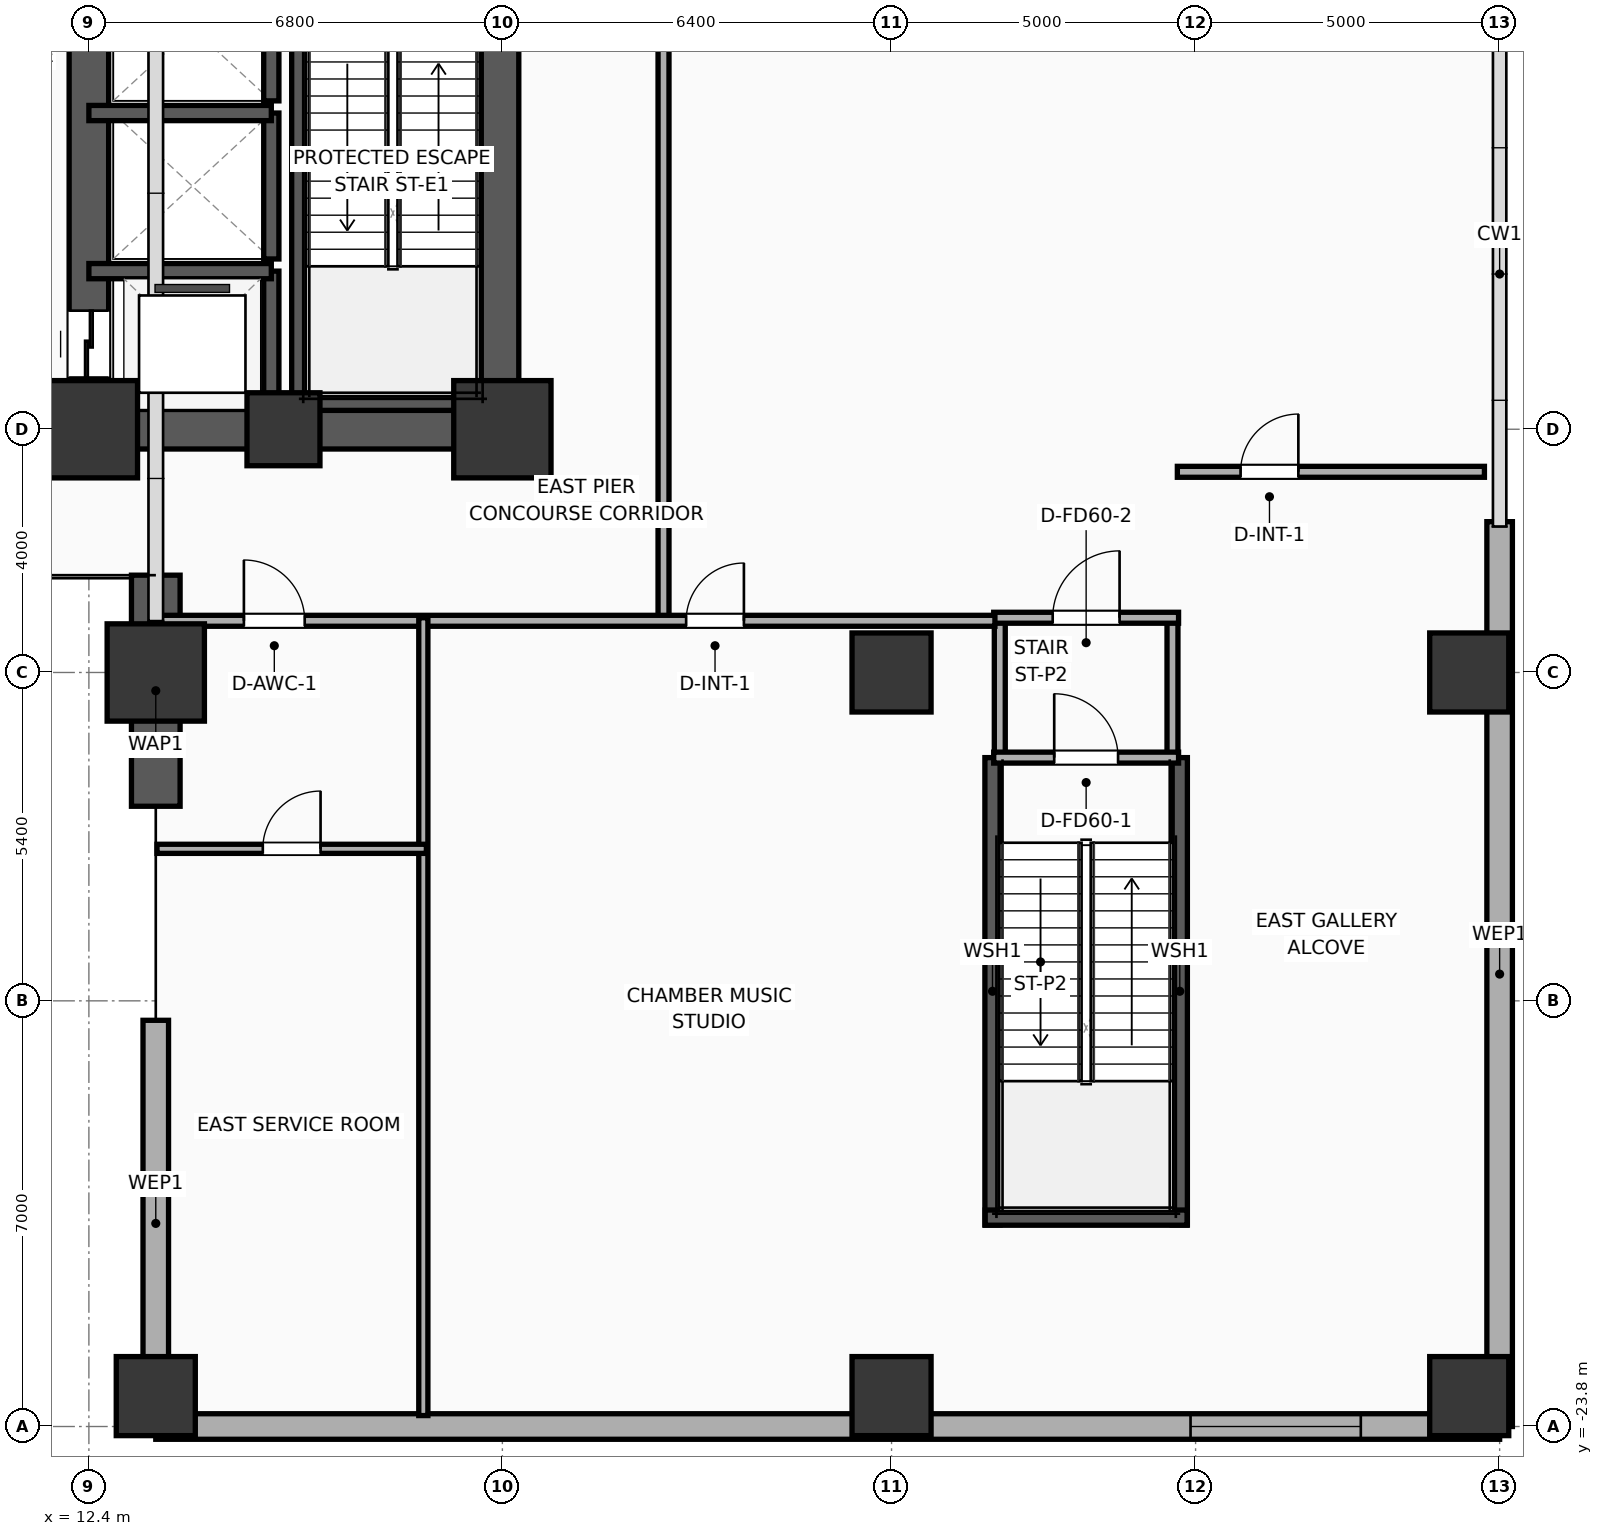
"""IFC4 building model, lengths in metres.
Left out: names, types, materials, properties, quantities, classifications, styles, units other than length and angle.
Written with IfcOpenShell. Run it as: python <this file> out.ifc"""

import sys

from ifc_helpers import new_model, si_unit, direction, frame, frame_2d, origin, origin_2d, place, context, subcontext, project, spatial, rectangle, extrude, element, fill, save


model = new_model("IFC4")
c1 = context("Model", 3, precision=1e-05, world=origin(), true_north=direction((0.0, 1.0)))
c2 = subcontext(c1, "Body", "Model", "MODEL_VIEW")
j1 = project(units=[si_unit("LENGTHUNIT", "METRE"), si_unit("PLANEANGLEUNIT", "RADIAN")], contexts=[c1])
p1 = place(None, origin())
s1 = spatial("IfcSite", under=j1, at=p1, CompositionType="ELEMENT")
p2 = place(p1, origin())
s2 = spatial("IfcBuilding", under=s1, at=p2, CompositionType="ELEMENT")
p3 = place(p2, frame((0.0, 0.0, 15.6)))
s3 = spatial("IfcBuildingStorey", under=s2, at=p3, CompositionType="ELEMENT", Elevation=15.6)
p4 = place(p3, frame((12.4, -7.4, 0.0), z_axis=(0.0, 0.0, 1.0), x_axis=(1.0, 0.0, 0.0)))
e1 = element("IfcColumn", 1, at=p4, inside=s3, PredefinedType="COLUMN", context=c2, shape_type="SweptSolid", body=[
    extrude(rectangle(XDim=1.6, YDim=1.6, at=origin_2d()), origin(), (0.0, 0.0, 1.0), 5.2),
])
p5 = place(p3, frame((15.6, -7.4, 0.0), z_axis=(0.0, 0.0, 1.0), x_axis=(1.0, 0.0, 0.0)))
e2 = element("IfcColumn", 2, at=p5, inside=s3, PredefinedType="COLUMN", context=c2, shape_type="SweptSolid", body=[
    extrude(rectangle(XDim=1.2, YDim=1.2, at=origin_2d()), origin(), (0.0, 0.0, 1.0), 5.2),
])
p6 = place(p3, frame((19.2, -7.4, 0.0), z_axis=(0.0, 0.0, 1.0), x_axis=(1.0, 0.0, 0.0)))
e3 = element("IfcColumn", 3, at=p6, inside=s3, PredefinedType="COLUMN", context=c2, shape_type="SweptSolid", body=[
    extrude(rectangle(XDim=1.6, YDim=1.6, at=origin_2d()), origin(), (0.0, 0.0, 1.0), 5.2),
])
p7 = place(p3, frame((12.075, -7.4, 0.0), z_axis=(0.0, 0.0, 1.0), x_axis=(1.0, 0.0, 0.0)))
e4 = element("IfcWall", 4, at=p7, inside=s3, PredefinedType="SHEAR", context=c2, shape_type="SweptSolid", body=[
    extrude(rectangle(XDim=7.45, YDim=0.65, at=frame_2d((3.725, 0.0))), origin(), (0.0, 0.0, 1.0), 4.8),
])
p8 = place(p3, frame((12.4, -7.4, 0.0), z_axis=(0.0, 0.0, 1.0), x_axis=(0.0, 1.0, 0.0)))
e5 = element("IfcWall", 5, at=p8, inside=s3, PredefinedType="SHEAR", context=c2, shape_type="SweptSolid", body=[
    extrude(rectangle(XDim=14.8, YDim=0.65, at=frame_2d((7.4, 0.0))), origin(), (0.0, 0.0, 1.0), 4.8),
])
p9 = place(p8, frame((0.85, 0.0, 0.0)))
e6 = element("IfcOpeningElement", 6, at=p9, cuts=e5, PredefinedType="OPENING", context=c2, shape_type="SweptSolid", body=[
    extrude(rectangle(XDim=1.1, YDim=2.05, at=frame_2d((0.55, 1.025))), frame((0.0, 0.335, 0.0), z_axis=(0.0, -1.0, 0.0), x_axis=(1.0, 0.0, 0.0)), (0.0, 0.0, 1.0), 0.67),
])
p10 = place(p8, frame((10.53, 0.0, 0.0)))
e7 = element("IfcOpeningElement", 7, at=p10, cuts=e5, PredefinedType="OPENING", context=c2, shape_type="SweptSolid", body=[
    extrude(rectangle(XDim=1.1, YDim=2.05, at=frame_2d((0.55, 1.025))), frame((0.0, 0.335, 0.0), z_axis=(0.0, -1.0, 0.0), x_axis=(1.0, 0.0, 0.0)), (0.0, 0.0, 1.0), 0.67),
])
p11 = place(p3, frame((19.145, -7.4, 0.0), z_axis=(0.0, 0.0, 1.0), x_axis=(0.0, 1.0, 0.0)))
e8 = element("IfcWall", 8, at=p11, inside=s3, PredefinedType="SHEAR", context=c2, shape_type="SweptSolid", body=[
    extrude(rectangle(XDim=14.8, YDim=0.65, at=frame_2d((7.4, 0.0))), origin(), (0.0, 0.0, 1.0), 4.8),
])
p12 = place(p3, frame((15.86, -7.085, 0.0), z_axis=(0.0, 0.0, 1.0), x_axis=(0.0, 1.0, 0.0)))
e9 = element("IfcWall", 9, at=p12, inside=s3, PredefinedType="SOLIDWALL", context=c2, shape_type="SweptSolid", body=[
    extrude(rectangle(XDim=7.685, YDim=0.25, at=frame_2d((3.843, 0.0))), origin(), (0.0, 0.0, 1.0), 4.8),
])
p13 = place(p3, frame((15.74, -6.965, 0.0), z_axis=(0.0, 0.0, 1.0), x_axis=(1.0, 0.0, 0.0)))
e10 = element("IfcWall", 10, at=p13, inside=s3, PredefinedType="SOLIDWALL", context=c2, shape_type="SweptSolid", body=[
    extrude(rectangle(XDim=3.46, YDim=0.25, at=frame_2d((1.73, 0.0))), origin(), (0.0, 0.0, 1.0), 4.8),
])
for number, where, z_axis, x_axis in (
    (11, (27.26, -20.485, 0.0), (0.0, 0.0, 1.0), (0.0, 1.0, 0.0)),
    (12, (30.34, -20.485, 0.0), (0.0, 0.0, 1.0), (0.0, 1.0, 0.0)),
):
    element("IfcWall", number, at=place(p3, frame(where, z_axis=z_axis, x_axis=x_axis)), inside=s3, PredefinedType="SOLIDWALL", context=c2, shape_type="SweptSolid", body=[
        extrude(rectangle(XDim=7.685, YDim=0.25, at=frame_2d((3.843, 0.0))), origin(), (0.0, 0.0, 1.0), 4.8),
    ])
p14 = place(p3, frame((27.14, -20.365, 0.0), z_axis=(0.0, 0.0, 1.0), x_axis=(1.0, 0.0, 0.0)))
e13 = element("IfcWall", 13, at=p14, inside=s3, PredefinedType="SOLIDWALL", context=c2, shape_type="SweptSolid", body=[
    extrude(rectangle(XDim=3.32, YDim=0.25, at=frame_2d((1.66, 0.0))), origin(), (0.0, 0.0, 1.0), 4.8),
])
p15 = place(p3, frame((13.5, -23.3, 0.0), z_axis=(0.0, 0.0, 1.0), x_axis=(1.0, 0.0, 0.0)))
e14 = element("IfcColumn", 14, at=p15, inside=s3, PredefinedType="COLUMN", context=c2, shape_type="SweptSolid", body=[
    extrude(rectangle(XDim=1.3, YDim=1.3, at=origin_2d()), origin(), (0.0, 0.0, 1.0), 5.2),
])
p16 = place(p3, frame((13.5, -11.4, 0.0), z_axis=(0.0, 0.0, 1.0), x_axis=(1.0, 0.0, 0.0)))
e15 = element("IfcColumn", 15, at=p16, inside=s3, PredefinedType="COLUMN", context=c2, shape_type="SweptSolid", body=[
    extrude(rectangle(XDim=1.6, YDim=1.6, at=origin_2d()), origin(), (0.0, 0.0, 1.0), 5.2),
])
for number, where, z_axis, x_axis in (
    (16, (25.6, -23.3, 0.0), (0.0, 0.0, 1.0), (1.0, 0.0, 0.0)),
    (17, (25.6, -11.4, 0.0), (0.0, 0.0, 1.0), (1.0, 0.0, 0.0)),
    (18, (35.1, -23.3, 0.0), (0.0, 0.0, 1.0), (1.0, 0.0, 0.0)),
    (19, (35.1, -11.4, 0.0), (0.0, 0.0, 1.0), (1.0, 0.0, 0.0)),
):
    element("IfcColumn", number, at=place(p3, frame(where, z_axis=z_axis, x_axis=x_axis)), inside=s3, PredefinedType="COLUMN", context=c2, shape_type="SweptSolid", body=[
        extrude(rectangle(XDim=1.3, YDim=1.3, at=origin_2d()), origin(), (0.0, 0.0, 1.0), 5.2),
    ])
p17 = place(p3, frame((13.5, -13.6, 0.0), z_axis=(0.0, 0.0, 1.0), x_axis=(0.0, 1.0, 0.0)))
e20 = element("IfcWall", 20, at=p17, inside=s3, PredefinedType="SOLIDWALL", context=c2, shape_type="SweptSolid", body=[
    extrude(rectangle(XDim=3.8, YDim=0.8, at=frame_2d((1.9, 0.0))), origin(), (0.0, 0.0, 1.0), 4.8),
])
p18 = place(p3, frame((13.5, -23.8, 0.0), z_axis=(0.0, 0.0, 1.0), x_axis=(1.0, 0.0, 0.0)))
e21 = element("IfcWall", 21, at=p18, inside=s3, PredefinedType="ELEMENTEDWALL", context=c2, shape_type="SweptSolid", body=[
    extrude(rectangle(XDim=22.1, YDim=0.42, at=frame_2d((11.05, 0.0))), origin(), (0.0, 0.0, 1.0), 4.8),
])
p19 = place(p18, frame((17.017, 0.0, 0.65)))
e22 = element("IfcOpeningElement", 22, at=p19, cuts=e21, PredefinedType="OPENING", context=c2, shape_type="SweptSolid", body=[
    extrude(rectangle(XDim=2.8, YDim=2.6, at=frame_2d((1.4, 1.3))), frame((0.0, 0.22, 0.0), z_axis=(0.0, -1.0, 0.0), x_axis=(1.0, 0.0, 0.0)), (0.0, 0.0, 1.0), 0.44),
])
p20 = place(p3, frame((35.6, -23.8, 0.0), z_axis=(0.0, 0.0, 1.0), x_axis=(0.0, 1.0, 0.0)))
e23 = element("IfcWall", 23, at=p20, inside=s3, PredefinedType="ELEMENTEDWALL", context=c2, shape_type="SweptSolid", body=[
    extrude(rectangle(XDim=14.88, YDim=0.42, at=frame_2d((7.44, 0.0))), origin(), (0.0, 0.0, 1.0), 4.8),
])
p21 = place(p3, frame((13.5, -23.8, 0.0), z_axis=(0.0, 0.0, 1.0), x_axis=(0.0, 1.0, 0.0)))
e24 = element("IfcWall", 24, at=p21, inside=s3, PredefinedType="ELEMENTEDWALL", context=c2, shape_type="SweptSolid", body=[
    extrude(rectangle(XDim=6.68, YDim=0.42, at=frame_2d((3.34, 0.0))), origin(), (0.0, 0.0, 1.0), 4.09),
])
p22 = place(p3, frame((15.4, -7.4, 0.0), z_axis=(0.0, 0.0, 1.0), x_axis=(0.0, 1.0, 0.0)))
e25 = element("IfcWall", 25, at=p22, inside=s3, PredefinedType="SOLIDWALL", context=c2, shape_type="SweptSolid", body=[
    extrude(rectangle(XDim=2.6, YDim=0.25, at=frame_2d((1.3, 0.0))), origin(), (0.0, 0.0, 1.0), 4.8),
])
p23 = place(p3, frame((15.4, -4.8, 0.0), z_axis=(0.0, 0.0, 1.0), x_axis=(-1.0, 0.0, 0.0)))
e26 = element("IfcWall", 26, at=p23, inside=s3, PredefinedType="SOLIDWALL", context=c2, shape_type="SweptSolid", body=[
    extrude(rectangle(XDim=3.0, YDim=0.25, at=frame_2d((1.5, 0.0))), origin(), (0.0, 0.0, 1.0), 4.8),
])
p24 = place(p3, frame((15.4, -4.6, 0.0), z_axis=(0.0, 0.0, 1.0), x_axis=(0.0, 1.0, 0.0)))
e27 = element("IfcWall", 27, at=p24, inside=s3, PredefinedType="SOLIDWALL", context=c2, shape_type="SweptSolid", body=[
    extrude(rectangle(XDim=2.4, YDim=0.25, at=frame_2d((1.2, 0.0))), origin(), (0.0, 0.0, 1.0), 4.8),
])
p25 = place(p3, frame((15.4, -2.2, 0.0), z_axis=(0.0, 0.0, 1.0), x_axis=(-1.0, 0.0, 0.0)))
e28 = element("IfcWall", 28, at=p25, inside=s3, PredefinedType="SOLIDWALL", context=c2, shape_type="SweptSolid", body=[
    extrude(rectangle(XDim=3.0, YDim=0.25, at=frame_2d((1.5, 0.0))), origin(), (0.0, 0.0, 1.0), 4.8),
])
p26 = place(p3, frame((15.4, -2.0, 0.0), z_axis=(0.0, 0.0, 1.0), x_axis=(0.0, 1.0, 0.0)))
e29 = element("IfcWall", 29, at=p26, inside=s3, PredefinedType="SOLIDWALL", context=c2, shape_type="SweptSolid", body=[
    extrude(rectangle(XDim=2.4, YDim=0.25, at=frame_2d((1.2, 0.0))), origin(), (0.0, 0.0, 1.0), 4.8),
])
p27 = place(p3, frame((9.88, -7.12, 0.0), z_axis=(0.0, 0.0, 1.0), x_axis=(1.0, 0.0, 0.0)))
e30 = element("IfcWall", 30, at=p27, inside=s3, PredefinedType="PARTITIONING", context=c2, shape_type="SweptSolid", body=[
    extrude(rectangle(XDim=2.27, YDim=0.18, at=frame_2d((1.135, 0.0))), origin(), (0.0, 0.0, 1.0), 4.09),
])
p28 = place(p27, frame((0.585, 0.0, 0.0)))
e31 = element("IfcOpeningElement", 31, at=p28, cuts=e30, PredefinedType="OPENING", context=c2, shape_type="SweptSolid", body=[
    extrude(rectangle(XDim=1.1, YDim=2.05, at=frame_2d((0.55, 1.025))), frame((0.0, 0.1, 0.0), z_axis=(0.0, -1.0, 0.0), x_axis=(1.0, 0.0, 0.0)), (0.0, 0.0, 1.0), 0.2),
])
for number, where, z_axis, x_axis in (
    (32, (27.38, -12.8, 0.0), (0.0, 0.0, 1.0), (0.0, 1.0, 0.0)),
    (33, (30.22, -12.8, 0.0), (0.0, 0.0, 1.0), (0.0, 1.0, 0.0)),
):
    element("IfcWall", number, at=place(p3, frame(where, z_axis=z_axis, x_axis=x_axis)), inside=s3, PredefinedType="PARTITIONING", context=c2, shape_type="SweptSolid", body=[
        extrude(rectangle(XDim=2.35, YDim=0.18, at=frame_2d((1.175, 0.0))), origin(), (0.0, 0.0, 1.0), 4.8),
    ])
p29 = place(p3, frame((27.28, -12.8, 0.0), z_axis=(0.0, 0.0, 1.0), x_axis=(1.0, 0.0, 0.0)))
e34 = element("IfcWall", 34, at=p29, inside=s3, PredefinedType="PARTITIONING", context=c2, shape_type="SweptSolid", body=[
    extrude(rectangle(XDim=3.04, YDim=0.18, at=frame_2d((1.52, 0.0))), origin(), (0.0, 0.0, 1.0), 4.8),
])
p30 = place(p29, frame((0.995, 0.0, 0.0)))
e35 = element("IfcOpeningElement", 35, at=p30, cuts=e34, PredefinedType="OPENING", context=c2, shape_type="SweptSolid", body=[
    extrude(rectangle(XDim=1.05, YDim=2.05, at=frame_2d((0.525, 1.025))), frame((0.0, 0.1, 0.0), z_axis=(0.0, -1.0, 0.0), x_axis=(1.0, 0.0, 0.0)), (0.0, 0.0, 1.0), 0.2),
])
p31 = place(p3, frame((27.28, -10.5, 0.0), z_axis=(0.0, 0.0, 1.0), x_axis=(1.0, 0.0, 0.0)))
e36 = element("IfcWall", 36, at=p31, inside=s3, PredefinedType="PARTITIONING", context=c2, shape_type="SweptSolid", body=[
    extrude(rectangle(XDim=3.04, YDim=0.18, at=frame_2d((1.52, 0.0))), origin(), (0.0, 0.0, 1.0), 4.8),
])
p32 = place(p31, frame((0.97, 0.0, 0.0)))
e37 = element("IfcOpeningElement", 37, at=p32, cuts=e36, PredefinedType="OPENING", context=c2, shape_type="SweptSolid", body=[
    extrude(rectangle(XDim=1.1, YDim=2.05, at=frame_2d((0.55, 1.025))), frame((0.0, 0.1, 0.0), z_axis=(0.0, -1.0, 0.0), x_axis=(1.0, 0.0, 0.0)), (0.0, 0.0, 1.0), 0.2),
])
p33 = place(p3, frame((21.85, -10.5, 0.0), z_axis=(0.0, 0.0, 1.0), x_axis=(0.0, 1.0, 0.0)))
e38 = element("IfcWall", 38, at=p33, inside=s3, PredefinedType="PARTITIONING", context=c2, shape_type="SweptSolid", body=[
    extrude(rectangle(XDim=34.12, YDim=0.18, at=frame_2d((17.06, 0.0))), origin(), (0.0, 0.0, 1.0), 4.8),
])
p34 = place(p33, frame((13.531, 0.0, 0.0)))
e39 = element("IfcOpeningElement", 39, at=p34, cuts=e38, PredefinedType="OPENING", context=c2, shape_type="SweptSolid", body=[
    extrude(rectangle(XDim=1.6, YDim=2.05, at=frame_2d((0.8, 1.025))), frame((0.0, 0.1, 0.0), z_axis=(0.0, -1.0, 0.0), x_axis=(1.0, 0.0, 0.0)), (0.0, 0.0, 1.0), 0.2),
])
p35 = place(p3, frame((30.3, -8.1, 0.0), z_axis=(0.0, 0.0, 1.0), x_axis=(1.0, 0.0, 0.0)))
e40 = element("IfcWall", 40, at=p35, inside=s3, PredefinedType="PARTITIONING", context=c2, shape_type="SweptSolid", body=[
    extrude(rectangle(XDim=5.05, YDim=0.18, at=frame_2d((2.525, 0.0))), origin(), (0.0, 0.0, 1.0), 4.8),
])
p36 = place(p35, frame((1.04, 0.0, 0.0)))
e41 = element("IfcOpeningElement", 41, at=p36, cuts=e40, PredefinedType="OPENING", context=c2, shape_type="SweptSolid", body=[
    extrude(rectangle(XDim=0.95, YDim=2.05, at=frame_2d((0.475, 1.025))), frame((0.0, 0.1, 0.0), z_axis=(0.0, -1.0, 0.0), x_axis=(1.0, 0.0, 0.0)), (0.0, 0.0, 1.0), 0.2),
])
p37 = place(p3, frame((13.52, -10.55, 0.0), z_axis=(0.0, 0.0, 1.0), x_axis=(1.0, 0.0, 0.0)))
e42 = element("IfcWall", 42, at=p37, inside=s3, PredefinedType="PARTITIONING", context=c2, shape_type="SweptSolid", body=[
    extrude(rectangle(XDim=13.78, YDim=0.18, at=frame_2d((6.89, 0.0))), origin(), (0.0, 0.0, 1.0), 4.8),
])
p38 = place(p37, frame((1.429, 0.0, 0.0)))
e43 = element("IfcOpeningElement", 43, at=p38, cuts=e42, PredefinedType="OPENING", context=c2, shape_type="SweptSolid", body=[
    extrude(rectangle(XDim=1.0, YDim=2.05, at=frame_2d((0.5, 1.025))), frame((0.0, 0.1, 0.0), z_axis=(0.0, -1.0, 0.0), x_axis=(1.0, 0.0, 0.0)), (0.0, 0.0, 1.0), 0.2),
])
p39 = place(p37, frame((8.702, 0.0, 0.0)))
e44 = element("IfcOpeningElement", 44, at=p39, cuts=e42, PredefinedType="OPENING", context=c2, shape_type="SweptSolid", body=[
    extrude(rectangle(XDim=0.95, YDim=2.05, at=frame_2d((0.475, 1.025))), frame((0.0, 0.1, 0.0), z_axis=(0.0, -1.0, 0.0), x_axis=(1.0, 0.0, 0.0)), (0.0, 0.0, 1.0), 0.2),
])
p40 = place(p3, frame((17.9, -23.62, 0.0), z_axis=(0.0, 0.0, 1.0), x_axis=(0.0, 1.0, 0.0)))
e45 = element("IfcWall", 45, at=p40, inside=s3, PredefinedType="PLUMBINGWALL", context=c2, shape_type="SweptSolid", body=[
    extrude(rectangle(XDim=13.12, YDim=0.15, at=frame_2d((6.56, 0.0))), origin(), (0.0, 0.0, 1.0), 4.8),
])
p41 = place(p3, frame((13.52, -14.3, 0.0), z_axis=(0.0, 0.0, 1.0), x_axis=(1.0, 0.0, 0.0)))
e46 = element("IfcWall", 46, at=p41, inside=s3, PredefinedType="PLUMBINGWALL", context=c2, shape_type="SweptSolid", body=[
    extrude(rectangle(XDim=4.43, YDim=0.15, at=frame_2d((2.215, 0.0))), origin(), (0.0, 0.0, 1.0), 4.8),
])
p42 = place(p41, frame((1.74, 0.0, 0.0)))
e47 = element("IfcOpeningElement", 47, at=p42, cuts=e46, PredefinedType="OPENING", context=c2, shape_type="SweptSolid", body=[
    extrude(rectangle(XDim=0.95, YDim=2.05, at=frame_2d((0.475, 1.025))), frame((0.0, 0.085, 0.0), z_axis=(0.0, -1.0, 0.0), x_axis=(1.0, 0.0, 0.0)), (0.0, 0.0, 1.0), 0.17),
])
p43 = place(p19, origin())
e48 = element("IfcWindow", 48, at=p43, inside=s3, PartitioningType="SINGLE_PANEL", PredefinedType="WINDOW", context=c2, shape_type="SweptSolid", body=[
    extrude(rectangle(XDim=2.8, YDim=2.6, at=frame_2d((1.4, 1.3))), frame((0.0, 0.03, 0.0), z_axis=(0.0, -1.0, 0.0), x_axis=(1.0, 0.0, 0.0)), (0.0, 0.0, 1.0), 0.06),
])
fill(e22, e48)
p44 = place(p9, origin())
e49 = element("IfcDoor", 49, at=p44, inside=s3, OperationType="SLIDING_TO_LEFT", PredefinedType="DOOR", context=c2, shape_type="SweptSolid", body=[
    extrude(rectangle(XDim=1.1, YDim=2.05, at=frame_2d((0.55, 1.025))), frame((0.0, 0.025, 0.0), z_axis=(0.0, -1.0, 0.0), x_axis=(1.0, 0.0, 0.0)), (0.0, 0.0, 1.0), 0.05),
])
fill(e6, e49)
p45 = place(p30, origin())
e50 = element("IfcDoor", 50, at=p45, inside=s3, OperationType="SINGLE_SWING_LEFT", PredefinedType="DOOR", context=c2, shape_type="SweptSolid", body=[
    extrude(rectangle(XDim=1.05, YDim=2.05, at=frame_2d((0.525, 1.025))), frame((0.0, 0.025, 0.0), z_axis=(0.0, -1.0, 0.0), x_axis=(1.0, 0.0, 0.0)), (0.0, 0.0, 1.0), 0.05),
])
fill(e35, e50)
p46 = place(p32, origin())
e51 = element("IfcDoor", 51, at=p46, inside=s3, OperationType="SINGLE_SWING_RIGHT", PredefinedType="DOOR", context=c2, shape_type="SweptSolid", body=[
    extrude(rectangle(XDim=1.1, YDim=2.05, at=frame_2d((0.55, 1.025))), frame((0.0, 0.025, 0.0), z_axis=(0.0, -1.0, 0.0), x_axis=(1.0, 0.0, 0.0)), (0.0, 0.0, 1.0), 0.05),
])
fill(e37, e51)
p47 = place(p36, origin())
e52 = element("IfcDoor", 52, at=p47, inside=s3, OperationType="SINGLE_SWING_RIGHT", PredefinedType="DOOR", context=c2, shape_type="SweptSolid", body=[
    extrude(rectangle(XDim=0.95, YDim=2.05, at=frame_2d((0.475, 1.025))), frame((0.0, 0.025, 0.0), z_axis=(0.0, -1.0, 0.0), x_axis=(1.0, 0.0, 0.0)), (0.0, 0.0, 1.0), 0.05),
])
fill(e41, e52)
p48 = place(p38, origin())
e53 = element("IfcDoor", 53, at=p48, inside=s3, OperationType="SINGLE_SWING_LEFT", PredefinedType="DOOR", context=c2, shape_type="SweptSolid", body=[
    extrude(rectangle(XDim=1.0, YDim=2.05, at=frame_2d((0.5, 1.025))), frame((0.0, 0.025, 0.0), z_axis=(0.0, -1.0, 0.0), x_axis=(1.0, 0.0, 0.0)), (0.0, 0.0, 1.0), 0.05),
])
fill(e43, e53)
p49 = place(p39, origin())
e54 = element("IfcDoor", 54, at=p49, inside=s3, OperationType="SINGLE_SWING_RIGHT", PredefinedType="DOOR", context=c2, shape_type="SweptSolid", body=[
    extrude(rectangle(XDim=0.95, YDim=2.05, at=frame_2d((0.475, 1.025))), frame((0.0, 0.025, 0.0), z_axis=(0.0, -1.0, 0.0), x_axis=(1.0, 0.0, 0.0)), (0.0, 0.0, 1.0), 0.05),
])
fill(e44, e54)
p50 = place(p42, origin())
e55 = element("IfcDoor", 55, at=p50, inside=s3, OperationType="SINGLE_SWING_RIGHT", PredefinedType="DOOR", context=c2, shape_type="SweptSolid", body=[
    extrude(rectangle(XDim=0.95, YDim=2.05, at=frame_2d((0.475, 1.025))), frame((0.0, 0.025, 0.0), z_axis=(0.0, -1.0, 0.0), x_axis=(1.0, 0.0, 0.0)), (0.0, 0.0, 1.0), 0.05),
])
fill(e47, e55)
save(model, sys.argv[1])
